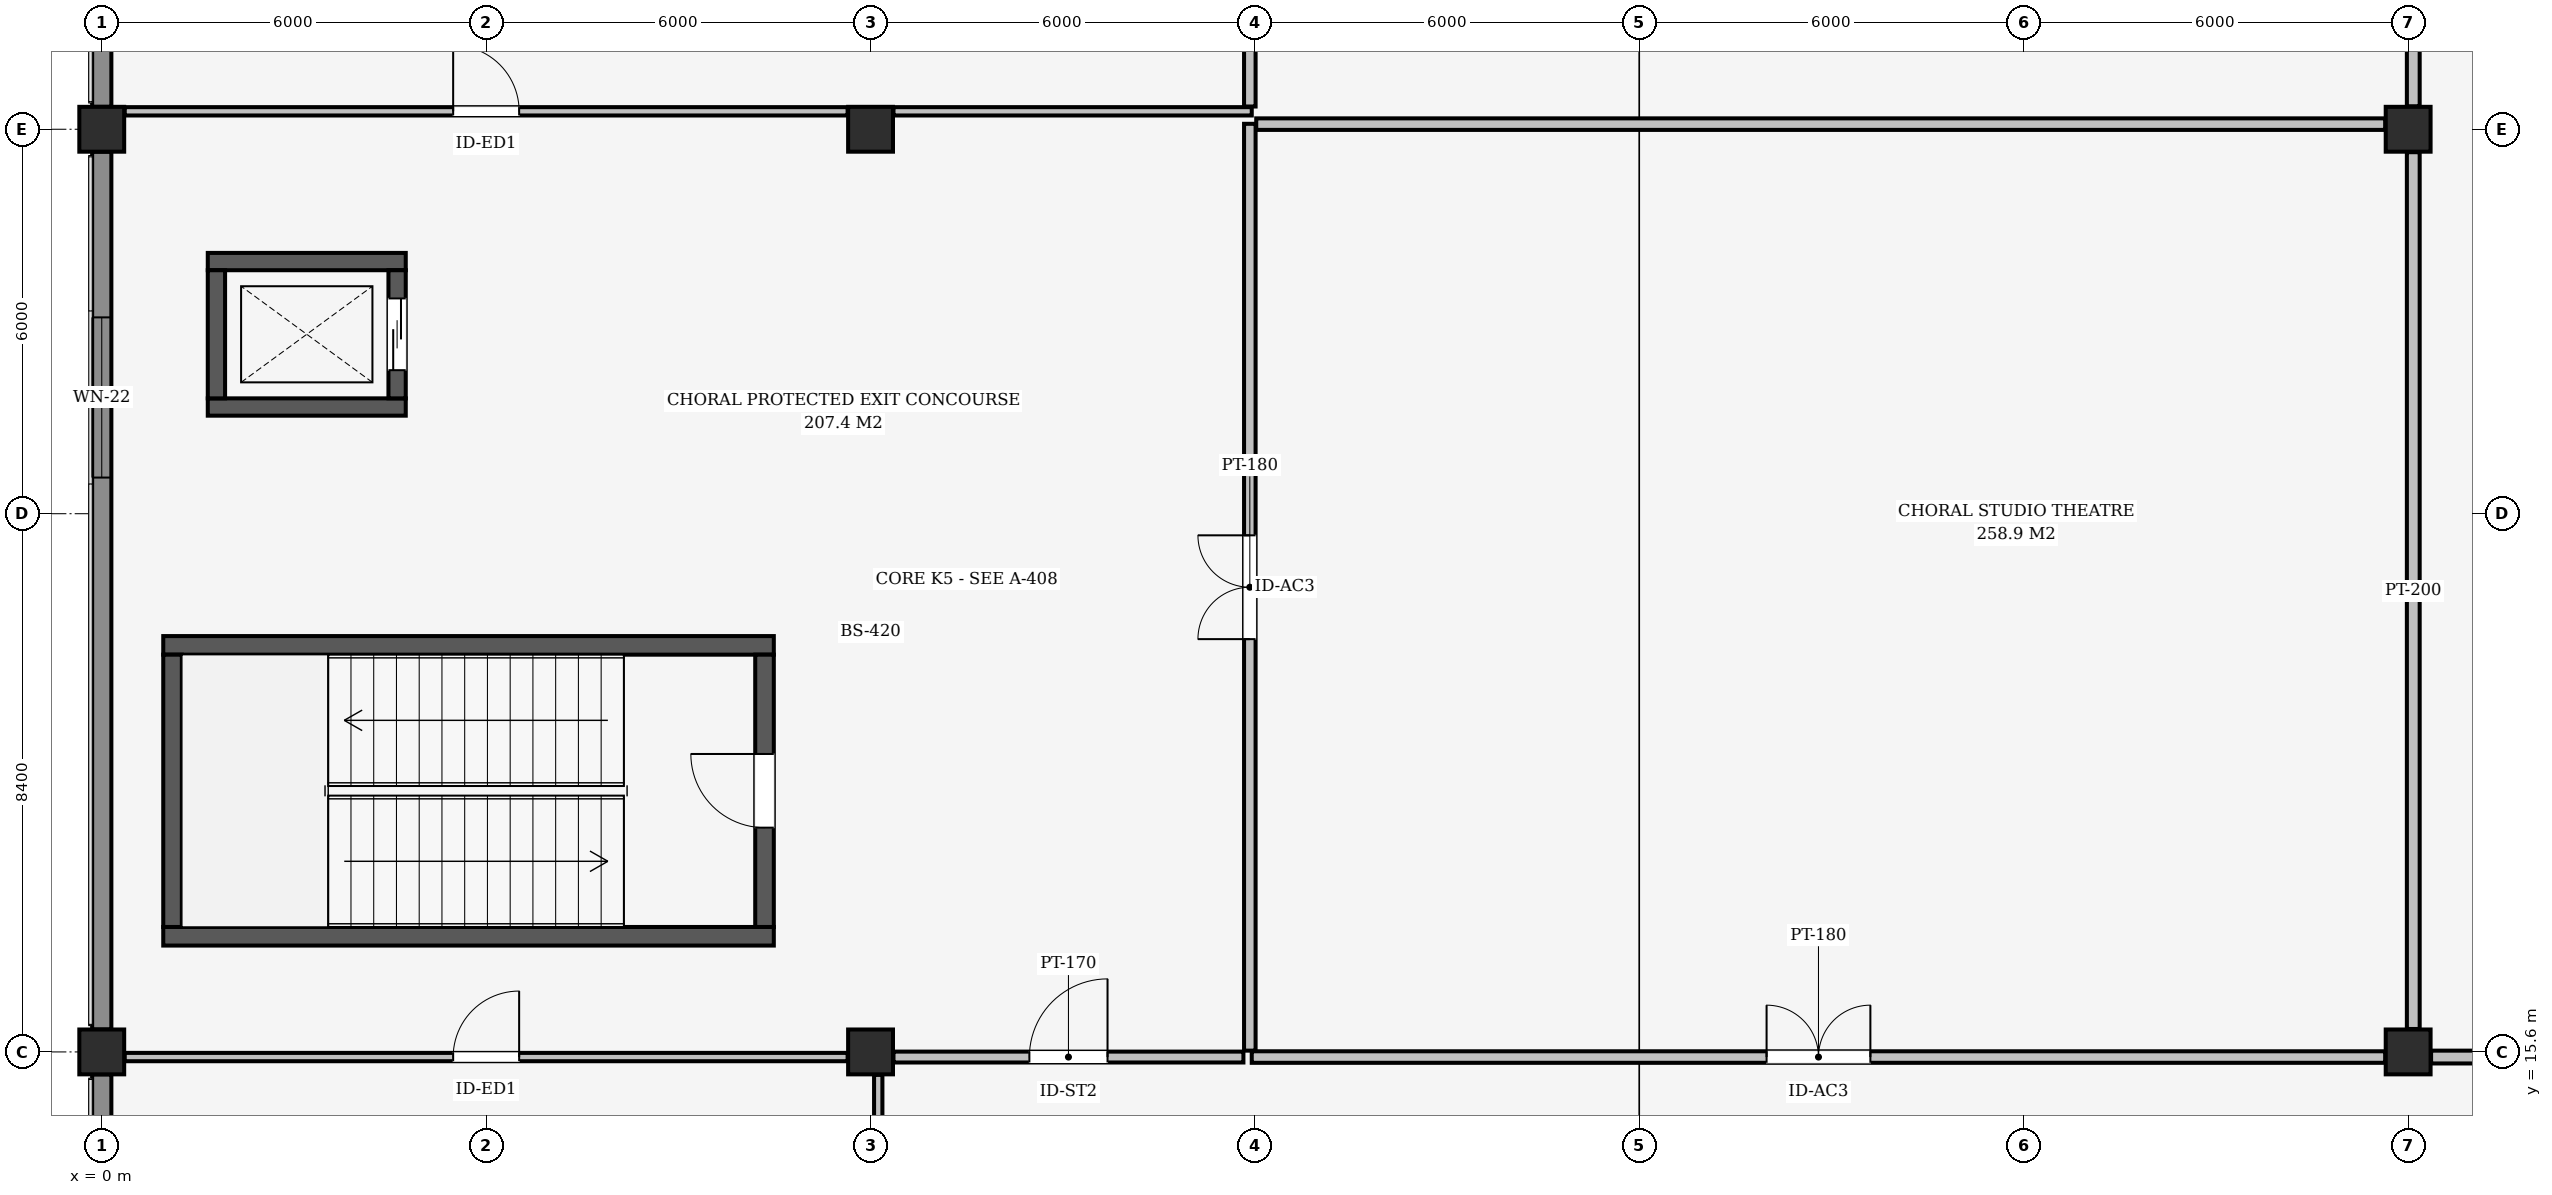
"""IFC4 building model, lengths in metres.
Left out: names, types, materials, properties, quantities, classifications, styles, units other than length and angle.
Written with IfcOpenShell. Run it as: python <this file> out.ifc"""

import sys

from ifc_helpers import new_model, si_unit, direction, frame, frame_2d, origin, origin_2d, place, context, subcontext, project, spatial, rectangle, extrude, element, fill, save


model = new_model("IFC4")
c1 = context("Model", 3, precision=1e-05, world=origin(), true_north=direction((0.0, 1.0)))
c2 = subcontext(c1, "Body", "Model", "MODEL_VIEW")
j1 = project(units=[si_unit("LENGTHUNIT", "METRE"), si_unit("PLANEANGLEUNIT", "RADIAN")], contexts=[c1])
p1 = place(None, origin())
s1 = spatial("IfcSite", under=j1, at=p1, CompositionType="ELEMENT")
p2 = place(p1, origin())
s2 = spatial("IfcBuilding", under=s1, at=p2, CompositionType="ELEMENT")
p3 = place(p2, origin())
s3 = spatial("IfcBuildingStorey", under=s2, at=p3, CompositionType="ELEMENT", Elevation=0.0)
for number, where, z_axis, x_axis in (
    (1, (0.0, 15.6, 0.0), (0.0, 0.0, 1.0), (1.0, 0.0, 0.0)),
    (2, (0.0, 30.0, 0.0), (0.0, 0.0, 1.0), (1.0, 0.0, 0.0)),
    (3, (12.0, 15.6, 0.0), (0.0, 0.0, 1.0), (1.0, 0.0, 0.0)),
    (4, (12.0, 30.0, 0.0), (0.0, 0.0, 1.0), (1.0, 0.0, 0.0)),
    (5, (36.0, 15.6, 0.0), (0.0, 0.0, 1.0), (1.0, 0.0, 0.0)),
    (6, (36.0, 30.0, 0.0), (0.0, 0.0, 1.0), (1.0, 0.0, 0.0)),
):
    element("IfcColumn", number, at=place(p3, frame(where, z_axis=z_axis, x_axis=x_axis)), inside=s3, PredefinedType="COLUMN", context=c2, shape_type="SweptSolid", body=[
        extrude(rectangle(XDim=0.7, YDim=0.7, at=origin_2d()), origin(), (0.0, 0.0, 1.0), 4.8),
    ])
p4 = place(p3, frame((0.0, 0.4, 0.0), z_axis=(0.0, 0.0, 1.0), x_axis=(0.0, 1.0, 0.0)))
e7 = element("IfcWall", 7, at=p4, inside=s3, PredefinedType="SOLIDWALL", context=c2, shape_type="SweptSolid", body=[
    extrude(rectangle(XDim=14.85, YDim=0.3, at=frame_2d((7.425, 0.0))), origin(), (0.0, 0.0, 1.0), 3.684),
])
p5 = place(p4, frame((6.0, 0.0, 0.6)))
e8 = element("IfcOpeningElement", 8, at=p5, cuts=e7, PredefinedType="OPENING", context=c2, shape_type="SweptSolid", body=[
    extrude(rectangle(XDim=2.85, YDim=2.0, at=frame_2d((1.425, 1.0))), frame((0.0, 0.16, 0.0), z_axis=(0.0, -1.0, 0.0), x_axis=(1.0, 0.0, 0.0)), (0.0, 0.0, 1.0), 0.32),
])
p6 = place(p3, frame((0.0, 15.95, 0.0), z_axis=(0.0, 0.0, 1.0), x_axis=(0.0, 1.0, 0.0)))
e9 = element("IfcWall", 9, at=p6, inside=s3, PredefinedType="SOLIDWALL", context=c2, shape_type="SweptSolid", body=[
    extrude(rectangle(XDim=13.7, YDim=0.3, at=frame_2d((6.85, 0.0))), origin(), (0.0, 0.0, 1.0), 3.919),
])
p7 = place(p6, frame((8.614, 0.0, 0.85)))
e10 = element("IfcOpeningElement", 10, at=p7, cuts=e9, PredefinedType="OPENING", context=c2, shape_type="SweptSolid", body=[
    extrude(rectangle(XDim=2.5, YDim=1.9, at=frame_2d((1.25, 0.95))), frame((0.0, 0.16, 0.0), z_axis=(0.0, -1.0, 0.0), x_axis=(1.0, 0.0, 0.0)), (0.0, 0.0, 1.0), 0.32),
])
p8 = place(p3, frame((0.0, 30.35, 0.0), z_axis=(0.0, 0.0, 1.0), x_axis=(0.0, 1.0, 0.0)))
e11 = element("IfcWall", 11, at=p8, inside=s3, PredefinedType="SOLIDWALL", context=c2, shape_type="SweptSolid", body=[
    extrude(rectangle(XDim=8.25, YDim=0.3, at=frame_2d((4.125, 0.0))), origin(), (0.0, 0.0, 1.0), 3.919),
])
p9 = place(p8, frame((3.175, 0.0, 0.85)))
e12 = element("IfcOpeningElement", 12, at=p9, cuts=e11, PredefinedType="OPENING", context=c2, shape_type="SweptSolid", body=[
    extrude(rectangle(XDim=1.9, YDim=1.6, at=frame_2d((0.95, 0.8))), frame((0.0, 0.16, 0.0), z_axis=(0.0, -1.0, 0.0), x_axis=(1.0, 0.0, 0.0)), (0.0, 0.0, 1.0), 0.32),
])
for number, where, z_axis, x_axis in (
    (13, (0.96, 17.405, 0.0), (0.0, 0.0, 1.0), (1.0, 0.0, 0.0)),
    (14, (0.96, 21.945, 0.0), (0.0, 0.0, 1.0), (1.0, 0.0, 0.0)),
):
    element("IfcWall", number, at=place(p3, frame(where, z_axis=z_axis, x_axis=x_axis)), inside=s3, PredefinedType="SHEAR", context=c2, shape_type="SweptSolid", body=[
        extrude(rectangle(XDim=9.53, YDim=0.29, at=frame_2d((4.765, 0.0))), origin(), (0.0, 0.0, 1.0), 4.55),
    ])
p10 = place(p3, frame((1.105, 17.55, 0.0), z_axis=(0.0, 0.0, 1.0), x_axis=(0.0, 1.0, 0.0)))
e15 = element("IfcWall", 15, at=p10, inside=s3, PredefinedType="SHEAR", context=c2, shape_type="SweptSolid", body=[
    extrude(rectangle(XDim=4.25, YDim=0.29, at=frame_2d((2.125, 0.0))), origin(), (0.0, 0.0, 1.0), 4.55),
])
p11 = place(p3, frame((10.345, 17.55, 0.0), z_axis=(0.0, 0.0, 1.0), x_axis=(0.0, 1.0, 0.0)))
e16 = element("IfcWall", 16, at=p11, inside=s3, PredefinedType="SHEAR", context=c2, shape_type="SweptSolid", body=[
    extrude(rectangle(XDim=4.25, YDim=0.29, at=frame_2d((2.125, 0.0))), origin(), (0.0, 0.0, 1.0), 4.55),
])
p12 = place(p11, frame((1.55, 0.0, 0.0)))
e17 = element("IfcOpeningElement", 17, at=p12, cuts=e16, PredefinedType="OPENING", context=c2, shape_type="SweptSolid", body=[
    extrude(rectangle(XDim=1.15, YDim=2.15, at=frame_2d((0.575, 1.075))), frame((0.0, 0.155, 0.0), z_axis=(0.0, -1.0, 0.0), x_axis=(1.0, 0.0, 0.0)), (0.0, 0.0, 1.0), 0.31),
])
for number, where, z_axis, x_axis in (
    (18, (1.655, 25.665, 0.0), (0.0, 0.0, 1.0), (1.0, 0.0, 0.0)),
    (19, (1.655, 27.935, 0.0), (0.0, 0.0, 1.0), (1.0, 0.0, 0.0)),
):
    element("IfcWall", number, at=place(p3, frame(where, z_axis=z_axis, x_axis=x_axis)), inside=s3, PredefinedType="SHEAR", context=c2, shape_type="SweptSolid", body=[
        extrude(rectangle(XDim=3.09, YDim=0.27, at=frame_2d((1.545, 0.0))), origin(), (0.0, 0.0, 1.0), 4.55),
    ])
p13 = place(p3, frame((1.79, 25.8, 0.0), z_axis=(0.0, 0.0, 1.0), x_axis=(0.0, 1.0, 0.0)))
e20 = element("IfcWall", 20, at=p13, inside=s3, PredefinedType="SHEAR", context=c2, shape_type="SweptSolid", body=[
    extrude(rectangle(XDim=2.0, YDim=0.27, at=frame_2d((1.0, 0.0))), origin(), (0.0, 0.0, 1.0), 4.55),
])
p14 = place(p3, frame((4.61, 25.8, 0.0), z_axis=(0.0, 0.0, 1.0), x_axis=(0.0, 1.0, 0.0)))
e21 = element("IfcWall", 21, at=p14, inside=s3, PredefinedType="SHEAR", context=c2, shape_type="SweptSolid", body=[
    extrude(rectangle(XDim=2.0, YDim=0.27, at=frame_2d((1.0, 0.0))), origin(), (0.0, 0.0, 1.0), 4.55),
])
p15 = place(p14, frame((0.44, 0.0, 0.0)))
e22 = element("IfcOpeningElement", 22, at=p15, cuts=e21, PredefinedType="OPENING", context=c2, shape_type="SweptSolid", body=[
    extrude(rectangle(XDim=1.12, YDim=2.15, at=frame_2d((0.56, 1.075))), frame((0.0, 0.145, 0.0), z_axis=(0.0, -1.0, 0.0), x_axis=(1.0, 0.0, 0.0)), (0.0, 0.0, 1.0), 0.29),
])
p16 = place(p3, frame((17.95, 15.52, 0.0), z_axis=(0.0, 0.0, 1.0), x_axis=(1.0, 0.0, 0.0)))
e23 = element("IfcWall", 23, at=p16, inside=s3, PredefinedType="PARTITIONING", context=c2, shape_type="SweptSolid", body=[
    extrude(rectangle(XDim=17.692, YDim=0.18, at=frame_2d((8.846, 0.0))), origin(), (0.0, 0.0, 1.0), 3.23),
])
p17 = place(p16, frame((8.036, 0.0, 0.0)))
e24 = element("IfcOpeningElement", 24, at=p17, cuts=e23, PredefinedType="OPENING", context=c2, shape_type="SweptSolid", body=[
    extrude(rectangle(XDim=1.62, YDim=2.28, at=frame_2d((0.81, 1.14))), frame((0.0, 0.1, 0.0), z_axis=(0.0, -1.0, 0.0), x_axis=(1.0, 0.0, 0.0)), (0.0, 0.0, 1.0), 0.2),
])
p18 = place(p3, frame((17.92, 15.62, 0.0), z_axis=(0.0, 0.0, 1.0), x_axis=(0.0, 1.0, 0.0)))
e25 = element("IfcWall", 25, at=p18, inside=s3, PredefinedType="PARTITIONING", context=c2, shape_type="SweptSolid", body=[
    extrude(rectangle(XDim=14.465, YDim=0.18, at=frame_2d((7.232, 0.0))), origin(), (0.0, 0.0, 1.0), 4.068),
])
p19 = place(p18, frame((6.423, 0.0, 0.0)))
e26 = element("IfcOpeningElement", 26, at=p19, cuts=e25, PredefinedType="OPENING", context=c2, shape_type="SweptSolid", body=[
    extrude(rectangle(XDim=1.62, YDim=2.28, at=frame_2d((0.81, 1.14))), frame((0.0, 0.1, 0.0), z_axis=(0.0, -1.0, 0.0), x_axis=(1.0, 0.0, 0.0)), (0.0, 0.0, 1.0), 0.2),
])
p20 = place(p3, frame((18.02, 30.08, 0.0), z_axis=(0.0, 0.0, 1.0), x_axis=(1.0, 0.0, 0.0)))
e27 = element("IfcWall", 27, at=p20, inside=s3, PredefinedType="PARTITIONING", context=c2, shape_type="SweptSolid", body=[
    extrude(rectangle(XDim=17.622, YDim=0.18, at=frame_2d((8.811, 0.0))), origin(), (0.0, 0.0, 1.0), 3.23),
])
p21 = place(p3, frame((36.08, 15.958, 0.0), z_axis=(0.0, 0.0, 1.0), x_axis=(0.0, 1.0, 0.0)))
e28 = element("IfcWall", 28, at=p21, inside=s3, PredefinedType="PARTITIONING", context=c2, shape_type="SweptSolid", body=[
    extrude(rectangle(XDim=13.684, YDim=0.2, at=frame_2d((6.842, 0.0))), origin(), (0.0, 0.0, 1.0), 3.919),
])
p22 = place(p3, frame((12.358, 15.52, 0.0), z_axis=(0.0, 0.0, 1.0), x_axis=(1.0, 0.0, 0.0)))
e29 = element("IfcWall", 29, at=p22, inside=s3, PredefinedType="PARTITIONING", context=c2, shape_type="SweptSolid", body=[
    extrude(rectangle(XDim=5.462, YDim=0.17, at=frame_2d((2.731, 0.0))), origin(), (0.0, 0.0, 1.0), 3.23),
])
p23 = place(p22, frame((2.121, 0.0, 0.0)))
e30 = element("IfcOpeningElement", 30, at=p23, cuts=e29, PredefinedType="OPENING", context=c2, shape_type="SweptSolid", body=[
    extrude(rectangle(XDim=1.22, YDim=2.18, at=frame_2d((0.61, 1.09))), frame((0.0, 0.095, 0.0), z_axis=(0.0, -1.0, 0.0), x_axis=(1.0, 0.0, 0.0)), (0.0, 0.0, 1.0), 0.19),
])
p24 = place(p3, frame((12.12, 0.408, 0.0), z_axis=(0.0, 0.0, 1.0), x_axis=(0.0, 1.0, 0.0)))
e31 = element("IfcWall", 31, at=p24, inside=s3, PredefinedType="PARTITIONING", context=c2, shape_type="SweptSolid", body=[
    extrude(rectangle(XDim=14.834, YDim=0.13, at=frame_2d((7.417, 0.0))), origin(), (0.0, 0.0, 1.0), 3.684),
])
p25 = place(p3, frame((36.358, 15.52, 0.0), z_axis=(0.0, 0.0, 1.0), x_axis=(1.0, 0.0, 0.0)))
e32 = element("IfcWall", 32, at=p25, inside=s3, PredefinedType="PARTITIONING", context=c2, shape_type="SweptSolid", body=[
    extrude(rectangle(XDim=5.592, YDim=0.2, at=frame_2d((2.796, 0.0))), origin(), (0.0, 0.0, 1.0), 3.73),
])
p26 = place(p25, frame((2.341, 0.0, 0.0)))
e33 = element("IfcOpeningElement", 33, at=p26, cuts=e32, PredefinedType="OPENING", context=c2, shape_type="SweptSolid", body=[
    extrude(rectangle(XDim=0.91, YDim=2.1, at=frame_2d((0.455, 1.05))), frame((0.0, 0.11, 0.0), z_axis=(0.0, -1.0, 0.0), x_axis=(1.0, 0.0, 0.0)), (0.0, 0.0, 1.0), 0.22),
])
p27 = place(p3, frame((0.358, 15.52, 0.0), z_axis=(0.0, 0.0, 1.0), x_axis=(1.0, 0.0, 0.0)))
e34 = element("IfcWall", 34, at=p27, inside=s3, PredefinedType="PARTITIONING", context=c2, shape_type="SweptSolid", body=[
    extrude(rectangle(XDim=11.284, YDim=0.13, at=frame_2d((5.642, 0.0))), origin(), (0.0, 0.0, 1.0), 3.73),
])
p28 = place(p27, frame((5.127, 0.0, 0.0)))
e35 = element("IfcOpeningElement", 35, at=p28, cuts=e34, PredefinedType="OPENING", context=c2, shape_type="SweptSolid", body=[
    extrude(rectangle(XDim=1.03, YDim=2.18, at=frame_2d((0.515, 1.09))), frame((0.0, 0.075, 0.0), z_axis=(0.0, -1.0, 0.0), x_axis=(1.0, 0.0, 0.0)), (0.0, 0.0, 1.0), 0.15),
])
p29 = place(p3, frame((0.358, 30.28, 0.0), z_axis=(0.0, 0.0, 1.0), x_axis=(1.0, 0.0, 0.0)))
e36 = element("IfcWall", 36, at=p29, inside=s3, PredefinedType="PARTITIONING", context=c2, shape_type="SweptSolid", body=[
    extrude(rectangle(XDim=11.284, YDim=0.13, at=frame_2d((5.642, 0.0))), origin(), (0.0, 0.0, 1.0), 3.73),
])
p30 = place(p29, frame((5.127, 0.0, 0.0)))
e37 = element("IfcOpeningElement", 37, at=p30, cuts=e36, PredefinedType="OPENING", context=c2, shape_type="SweptSolid", body=[
    extrude(rectangle(XDim=1.03, YDim=2.18, at=frame_2d((0.515, 1.09))), frame((0.0, 0.075, 0.0), z_axis=(0.0, -1.0, 0.0), x_axis=(1.0, 0.0, 0.0)), (0.0, 0.0, 1.0), 0.15),
])
p31 = place(p3, frame((12.358, 30.28, 0.0), z_axis=(0.0, 0.0, 1.0), x_axis=(1.0, 0.0, 0.0)))
e38 = element("IfcWall", 38, at=p31, inside=s3, PredefinedType="PARTITIONING", context=c2, shape_type="SweptSolid", body=[
    extrude(rectangle(XDim=5.592, YDim=0.13, at=frame_2d((2.796, 0.0))), origin(), (0.0, 0.0, 1.0), 3.23),
])
p32 = place(p3, frame((17.92, 30.355, 0.0), z_axis=(0.0, 0.0, 1.0), x_axis=(0.0, 1.0, 0.0)))
e39 = element("IfcWall", 39, at=p32, inside=s3, PredefinedType="PARTITIONING", context=c2, shape_type="SweptSolid", body=[
    extrude(rectangle(XDim=8.595, YDim=0.18, at=frame_2d((4.297, 0.0))), origin(), (0.0, 0.0, 1.0), 4.073),
])
p33 = place(p3, frame((36.08, 30.358, 0.0), z_axis=(0.0, 0.0, 1.0), x_axis=(0.0, 1.0, 0.0)))
e40 = element("IfcWall", 40, at=p33, inside=s3, PredefinedType="PARTITIONING", context=c2, shape_type="SweptSolid", body=[
    extrude(rectangle(XDim=8.234, YDim=0.2, at=frame_2d((4.117, 0.0))), origin(), (0.0, 0.0, 1.0), 3.919),
])
p34 = place(p7, origin())
e41 = element("IfcWindow", 41, at=p34, inside=s3, PartitioningType="SINGLE_PANEL", PredefinedType="WINDOW", context=c2, shape_type="SweptSolid", body=[
    extrude(rectangle(XDim=2.5, YDim=1.9, at=frame_2d((1.25, 0.95))), frame((0.0, 0.03, 0.0), z_axis=(0.0, -1.0, 0.0), x_axis=(1.0, 0.0, 0.0)), (0.0, 0.0, 1.0), 0.06),
])
fill(e10, e41)
p35 = place(p12, origin())
e42 = element("IfcDoor", 42, at=p35, inside=s3, OperationType="SINGLE_SWING_RIGHT", PredefinedType="DOOR", context=c2, shape_type="SweptSolid", body=[
    extrude(rectangle(XDim=1.15, YDim=2.15, at=frame_2d((0.575, 1.075))), frame((0.0, 0.025, 0.0), z_axis=(0.0, -1.0, 0.0), x_axis=(1.0, 0.0, 0.0)), (0.0, 0.0, 1.0), 0.05),
])
fill(e17, e42)
p36 = place(p15, origin())
e43 = element("IfcDoor", 43, at=p36, inside=s3, OperationType="SLIDING_TO_LEFT", PredefinedType="DOOR", context=c2, shape_type="SweptSolid", body=[
    extrude(rectangle(XDim=1.12, YDim=2.15, at=frame_2d((0.56, 1.075))), frame((0.0, 0.025, 0.0), z_axis=(0.0, -1.0, 0.0), x_axis=(1.0, 0.0, 0.0)), (0.0, 0.0, 1.0), 0.05),
])
fill(e22, e43)
p37 = place(p17, origin())
e44 = element("IfcDoor", 44, at=p37, inside=s3, OperationType="DOUBLE_DOOR_SINGLE_SWING", PredefinedType="DOOR", context=c2, shape_type="SweptSolid", body=[
    extrude(rectangle(XDim=1.62, YDim=2.28, at=frame_2d((0.81, 1.14))), frame((0.0, 0.025, 0.0), z_axis=(0.0, -1.0, 0.0), x_axis=(1.0, 0.0, 0.0)), (0.0, 0.0, 1.0), 0.05),
])
fill(e24, e44)
p38 = place(p19, origin())
e45 = element("IfcDoor", 45, at=p38, inside=s3, OperationType="DOUBLE_DOOR_SINGLE_SWING", PredefinedType="DOOR", context=c2, shape_type="SweptSolid", body=[
    extrude(rectangle(XDim=1.62, YDim=2.28, at=frame_2d((0.81, 1.14))), frame((0.0, 0.025, 0.0), z_axis=(0.0, -1.0, 0.0), x_axis=(1.0, 0.0, 0.0)), (0.0, 0.0, 1.0), 0.05),
])
fill(e26, e45)
p39 = place(p23, origin())
e46 = element("IfcDoor", 46, at=p39, inside=s3, OperationType="SINGLE_SWING_RIGHT", PredefinedType="DOOR", context=c2, shape_type="SweptSolid", body=[
    extrude(rectangle(XDim=1.22, YDim=2.18, at=frame_2d((0.61, 1.09))), frame((0.0, 0.025, 0.0), z_axis=(0.0, -1.0, 0.0), x_axis=(1.0, 0.0, 0.0)), (0.0, 0.0, 1.0), 0.05),
])
fill(e30, e46)
p40 = place(p28, origin())
e47 = element("IfcDoor", 47, at=p40, inside=s3, OperationType="SINGLE_SWING_RIGHT", PredefinedType="DOOR", context=c2, shape_type="SweptSolid", body=[
    extrude(rectangle(XDim=1.03, YDim=2.18, at=frame_2d((0.515, 1.09))), frame((0.0, 0.025, 0.0), z_axis=(0.0, -1.0, 0.0), x_axis=(1.0, 0.0, 0.0)), (0.0, 0.0, 1.0), 0.05),
])
fill(e35, e47)
p41 = place(p30, origin())
e48 = element("IfcDoor", 48, at=p41, inside=s3, OperationType="SINGLE_SWING_LEFT", PredefinedType="DOOR", context=c2, shape_type="SweptSolid", body=[
    extrude(rectangle(XDim=1.03, YDim=2.18, at=frame_2d((0.515, 1.09))), frame((0.0, 0.025, 0.0), z_axis=(0.0, -1.0, 0.0), x_axis=(1.0, 0.0, 0.0)), (0.0, 0.0, 1.0), 0.05),
])
fill(e37, e48)
save(model, sys.argv[1])
